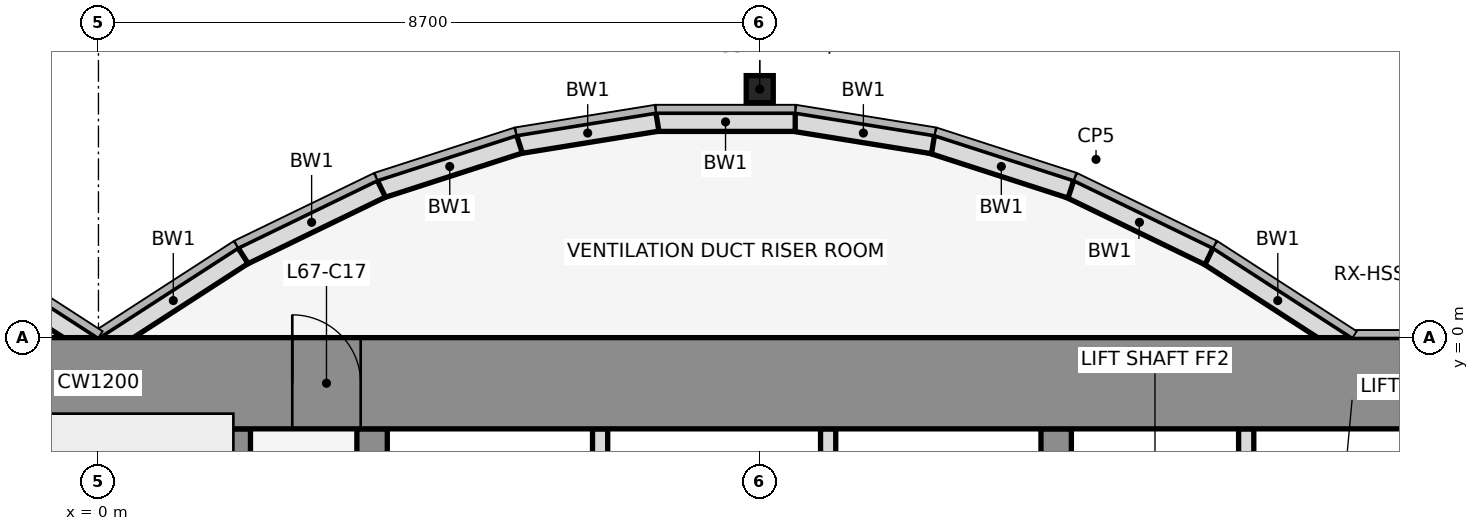
"""IFC4 building model, lengths in metres.
Left out: names, types, materials, properties, quantities, classifications, styles, units other than length and angle.
Written with IfcOpenShell. Run it as: python <this file> out.ifc"""

import sys

from ifc_helpers import new_model, si_unit, direction, frame, frame_2d, origin, origin_2d, place, context, subcontext, project, spatial, rectangle, hollow_rectangle, extrude, element, fill, save


model = new_model("IFC4")
c1 = context("Model", 3, precision=1e-05, world=origin(), true_north=direction((0.0, 1.0)))
c2 = subcontext(c1, "Body", "Model", "MODEL_VIEW")
j1 = project(units=[si_unit("LENGTHUNIT", "METRE"), si_unit("PLANEANGLEUNIT", "RADIAN")], contexts=[c1])
p1 = place(None, origin())
s1 = spatial("IfcSite", under=j1, at=p1, CompositionType="ELEMENT")
p2 = place(p1, origin())
s2 = spatial("IfcBuilding", under=s1, at=p2, CompositionType="ELEMENT")
p3 = place(p2, frame((0.0, 0.0, 297.5)))
s3 = spatial("IfcBuildingStorey", under=s2, at=p3, CompositionType="ELEMENT", Elevation=297.5)
p4 = place(p3, frame((8.7, 3.269, 0.0), z_axis=(0.0, 0.0, 1.0), x_axis=(1.0, 0.0, 0.0)))
e1 = element("IfcColumn", 1, at=p4, inside=s3, PredefinedType="COLUMN", context=c2, shape_type="SweptSolid", body=[
    extrude(hollow_rectangle(XDim=0.356, YDim=0.356, WallThickness=0.012, at=origin_2d()), origin(), (0.0, 0.0, 1.0), 4.5),
])
p5 = place(p3, frame((16.432, -0.105, 0.0), z_axis=(0.0, 0.0, 1.0), x_axis=(-0.83981312244, 0.542875602121, 0.0)))
e2 = element("IfcWall", 2, at=p5, inside=s3, PredefinedType="STANDARD", context=c2, shape_type="SweptSolid", body=[
    extrude(rectangle(XDim=2.183, YDim=0.25, at=frame_2d((1.091, 0.0))), origin(), (0.0, 0.0, 1.0), 4.35),
])
p6 = place(p3, frame((14.612, 1.073, 0.0), z_axis=(0.0, 0.0, 1.0), x_axis=(-0.89982408427, 0.436252928206, 0.0)))
e3 = element("IfcWall", 3, at=p6, inside=s3, PredefinedType="STANDARD", context=c2, shape_type="SweptSolid", body=[
    extrude(rectangle(XDim=2.038, YDim=0.25, at=frame_2d((1.019, 0.0))), origin(), (0.0, 0.0, 1.0), 4.35),
])
p7 = place(p3, frame((12.795, 1.955, 0.0), z_axis=(0.0, 0.0, 1.0), x_axis=(-0.951495806175, 0.307661714928, 0.0)))
e4 = element("IfcWall", 4, at=p7, inside=s3, PredefinedType="STANDARD", context=c2, shape_type="SweptSolid", body=[
    extrude(rectangle(XDim=1.927, YDim=0.25, at=frame_2d((0.963, 0.0))), origin(), (0.0, 0.0, 1.0), 4.35),
])
p8 = place(p3, frame((10.98, 2.543, 0.0), z_axis=(0.0, 0.0, 1.0), x_axis=(-0.987181718931, 0.159600293885, 0.0)))
e5 = element("IfcWall", 5, at=p8, inside=s3, PredefinedType="STANDARD", context=c2, shape_type="SweptSolid", body=[
    extrude(rectangle(XDim=1.857, YDim=0.25, at=frame_2d((0.929, 0.0))), origin(), (0.0, 0.0, 1.0), 4.35),
])
p9 = place(p3, frame((9.167, 2.838, 0.0), z_axis=(0.0, 0.0, 1.0), x_axis=(-1.0, 0.0, 0.0)))
e6 = element("IfcWall", 6, at=p9, inside=s3, PredefinedType="STANDARD", context=c2, shape_type="SweptSolid", body=[
    extrude(rectangle(XDim=1.833, YDim=0.25, at=frame_2d((0.917, 0.0))), origin(), (0.0, 0.0, 1.0), 4.35),
])
p10 = place(p3, frame((7.353, 2.84, 0.0), z_axis=(0.0, 0.0, 1.0), x_axis=(-0.987181718931, -0.159600293885, 0.0)))
e7 = element("IfcWall", 7, at=p10, inside=s3, PredefinedType="STANDARD", context=c2, shape_type="SweptSolid", body=[
    extrude(rectangle(XDim=1.857, YDim=0.25, at=frame_2d((0.929, 0.0))), origin(), (0.0, 0.0, 1.0), 4.35),
])
p11 = place(p3, frame((5.538, 2.548, 0.0), z_axis=(0.0, 0.0, 1.0), x_axis=(-0.951495806175, -0.307661714928, 0.0)))
e8 = element("IfcWall", 8, at=p11, inside=s3, PredefinedType="STANDARD", context=c2, shape_type="SweptSolid", body=[
    extrude(rectangle(XDim=1.927, YDim=0.25, at=frame_2d((0.963, 0.0))), origin(), (0.0, 0.0, 1.0), 4.35),
])
p12 = place(p3, frame((3.721, 1.962, 0.0), z_axis=(0.0, 0.0, 1.0), x_axis=(-0.89982408427, -0.436252928206, 0.0)))
e9 = element("IfcWall", 9, at=p12, inside=s3, PredefinedType="STANDARD", context=c2, shape_type="SweptSolid", body=[
    extrude(rectangle(XDim=2.038, YDim=0.25, at=frame_2d((1.019, 0.0))), origin(), (0.0, 0.0, 1.0), 4.35),
])
for number, where, z_axis, x_axis in (
    (10, (1.901, 1.08, 0.0), (0.0, 0.0, 1.0), (-0.84, -0.543, 0.0)),
    (11, (-0.068, -0.105, 0.0), (0.0, 0.0, 1.0), (-0.84, 0.543, 0.0)),
):
    element("IfcWall", number, at=place(p3, frame(where, z_axis=z_axis, x_axis=x_axis)), inside=s3, PredefinedType="STANDARD", context=c2, shape_type="SweptSolid", body=[
        extrude(rectangle(XDim=2.183, YDim=0.25, at=frame_2d((1.091, 0.0))), origin(), (0.0, 0.0, 1.0), 4.35),
    ])
p13 = place(p3, frame((1.8, -11.8, 0.0), z_axis=(0.0, 0.0, 1.0), x_axis=(0.0, 1.0, 0.0)))
e12 = element("IfcWall", 12, at=p13, inside=s3, PredefinedType="SHEAR", context=c2, shape_type="SweptSolid", body=[
    extrude(rectangle(XDim=10.6, YDim=0.4, at=frame_2d((5.3, 0.0))), origin(), (0.0, 0.0, 1.0), 4.5),
])
p14 = place(p3, frame((3.6, -11.8, 0.0), z_axis=(0.0, 0.0, 1.0), x_axis=(0.0, 1.0, 0.0)))
e13 = element("IfcWall", 13, at=p14, inside=s3, PredefinedType="SHEAR", context=c2, shape_type="SweptSolid", body=[
    extrude(rectangle(XDim=10.6, YDim=0.4, at=frame_2d((5.3, 0.0))), origin(), (0.0, 0.0, 1.0), 4.5),
])
p15 = place(p14, frame((1.35, 0.0, 0.0)))
e14 = element("IfcOpeningElement", 14, at=p15, cuts=e13, PredefinedType="OPENING", context=c2, shape_type="SweptSolid", body=[
    extrude(rectangle(XDim=0.9, YDim=2.1, at=frame_2d((0.45, 1.05))), frame((0.0, 0.212, 0.0), z_axis=(0.0, -1.0, 0.0), x_axis=(1.0, 0.0, 0.0)), (0.0, 0.0, 1.0), 0.424),
])
for number, where, z_axis, x_axis in (
    (15, (6.6, -4.6, 0.0), (0.0, 0.0, 1.0), (0.0, 1.0, 0.0)),
    (16, (9.6, -4.6, 0.0), (0.0, 0.0, 1.0), (0.0, 1.0, 0.0)),
):
    element("IfcWall", number, at=place(p3, frame(where, z_axis=z_axis, x_axis=x_axis)), inside=s3, PredefinedType="PARTITIONING", context=c2, shape_type="SweptSolid", body=[
        extrude(rectangle(XDim=3.4, YDim=0.2, at=frame_2d((1.7, 0.0))), origin(), (0.0, 0.0, 1.0), 3.418),
    ])
p16 = place(p3, frame((12.6, -11.8, 0.0), z_axis=(0.0, 0.0, 1.0), x_axis=(0.0, 1.0, 0.0)))
e17 = element("IfcWall", 17, at=p16, inside=s3, PredefinedType="SHEAR", context=c2, shape_type="SweptSolid", body=[
    extrude(rectangle(XDim=10.6, YDim=0.4, at=frame_2d((5.3, 0.0))), origin(), (0.0, 0.0, 1.0), 4.5),
])
p17 = place(p16, frame((4.75, 0.0, 0.0)))
e18 = element("IfcOpeningElement", 18, at=p17, cuts=e17, PredefinedType="OPENING", context=c2, shape_type="SweptSolid", body=[
    extrude(rectangle(XDim=1.1, YDim=2.1, at=frame_2d((0.55, 1.05))), frame((0.0, 0.212, 0.0), z_axis=(0.0, -1.0, 0.0), x_axis=(1.0, 0.0, 0.0)), (0.0, 0.0, 1.0), 0.424),
])
p18 = place(p3, frame((15.1, -4.6, 0.0), z_axis=(0.0, 0.0, 1.0), x_axis=(0.0, 1.0, 0.0)))
e19 = element("IfcWall", 19, at=p18, inside=s3, PredefinedType="PARTITIONING", context=c2, shape_type="SweptSolid", body=[
    extrude(rectangle(XDim=3.4, YDim=0.2, at=frame_2d((1.7, 0.0))), origin(), (0.0, 0.0, 1.0), 3.418),
])
p19 = place(p3, frame((-22.0, -0.6, 0.0), z_axis=(0.0, 0.0, 1.0), x_axis=(1.0, 0.0, 0.0)))
e20 = element("IfcWall", 20, at=p19, inside=s3, PredefinedType="SHEAR", context=c2, shape_type="SweptSolid", body=[
    extrude(rectangle(XDim=44.0, YDim=1.2, at=frame_2d((22.0, 0.0))), origin(), (0.0, 0.0, 1.0), 4.5),
])
p20 = place(p19, frame((18.55, 0.0, 0.0)))
e21 = element("IfcOpeningElement", 21, at=p20, cuts=e20, PredefinedType="OPENING", context=c2, shape_type="SweptSolid", body=[
    extrude(rectangle(XDim=0.9, YDim=2.1, at=frame_2d((0.45, 1.05))), frame((0.0, 0.612, 0.0), z_axis=(0.0, -1.0, 0.0), x_axis=(1.0, 0.0, 0.0)), (0.0, 0.0, 1.0), 1.224),
])
p21 = place(p19, frame((24.55, 0.0, 0.0)))
e22 = element("IfcOpeningElement", 22, at=p21, cuts=e20, PredefinedType="OPENING", context=c2, shape_type="SweptSolid", body=[
    extrude(rectangle(XDim=0.9, YDim=2.1, at=frame_2d((0.45, 1.05))), frame((0.0, 0.612, 0.0), z_axis=(0.0, -1.0, 0.0), x_axis=(1.0, 0.0, 0.0)), (0.0, 0.0, 1.0), 1.224),
])
p22 = place(p21, origin())
e23 = element("IfcDoor", 23, at=p22, inside=s3, OperationType="SINGLE_SWING_LEFT", PredefinedType="DOOR", context=c2, shape_type="SweptSolid", body=[
    extrude(rectangle(XDim=0.9, YDim=2.1, at=frame_2d((0.45, 1.05))), frame((0.0, 0.025, 0.0), z_axis=(0.0, -1.0, 0.0), x_axis=(1.0, 0.0, 0.0)), (0.0, 0.0, 1.0), 0.05),
])
fill(e22, e23)
save(model, sys.argv[1])
